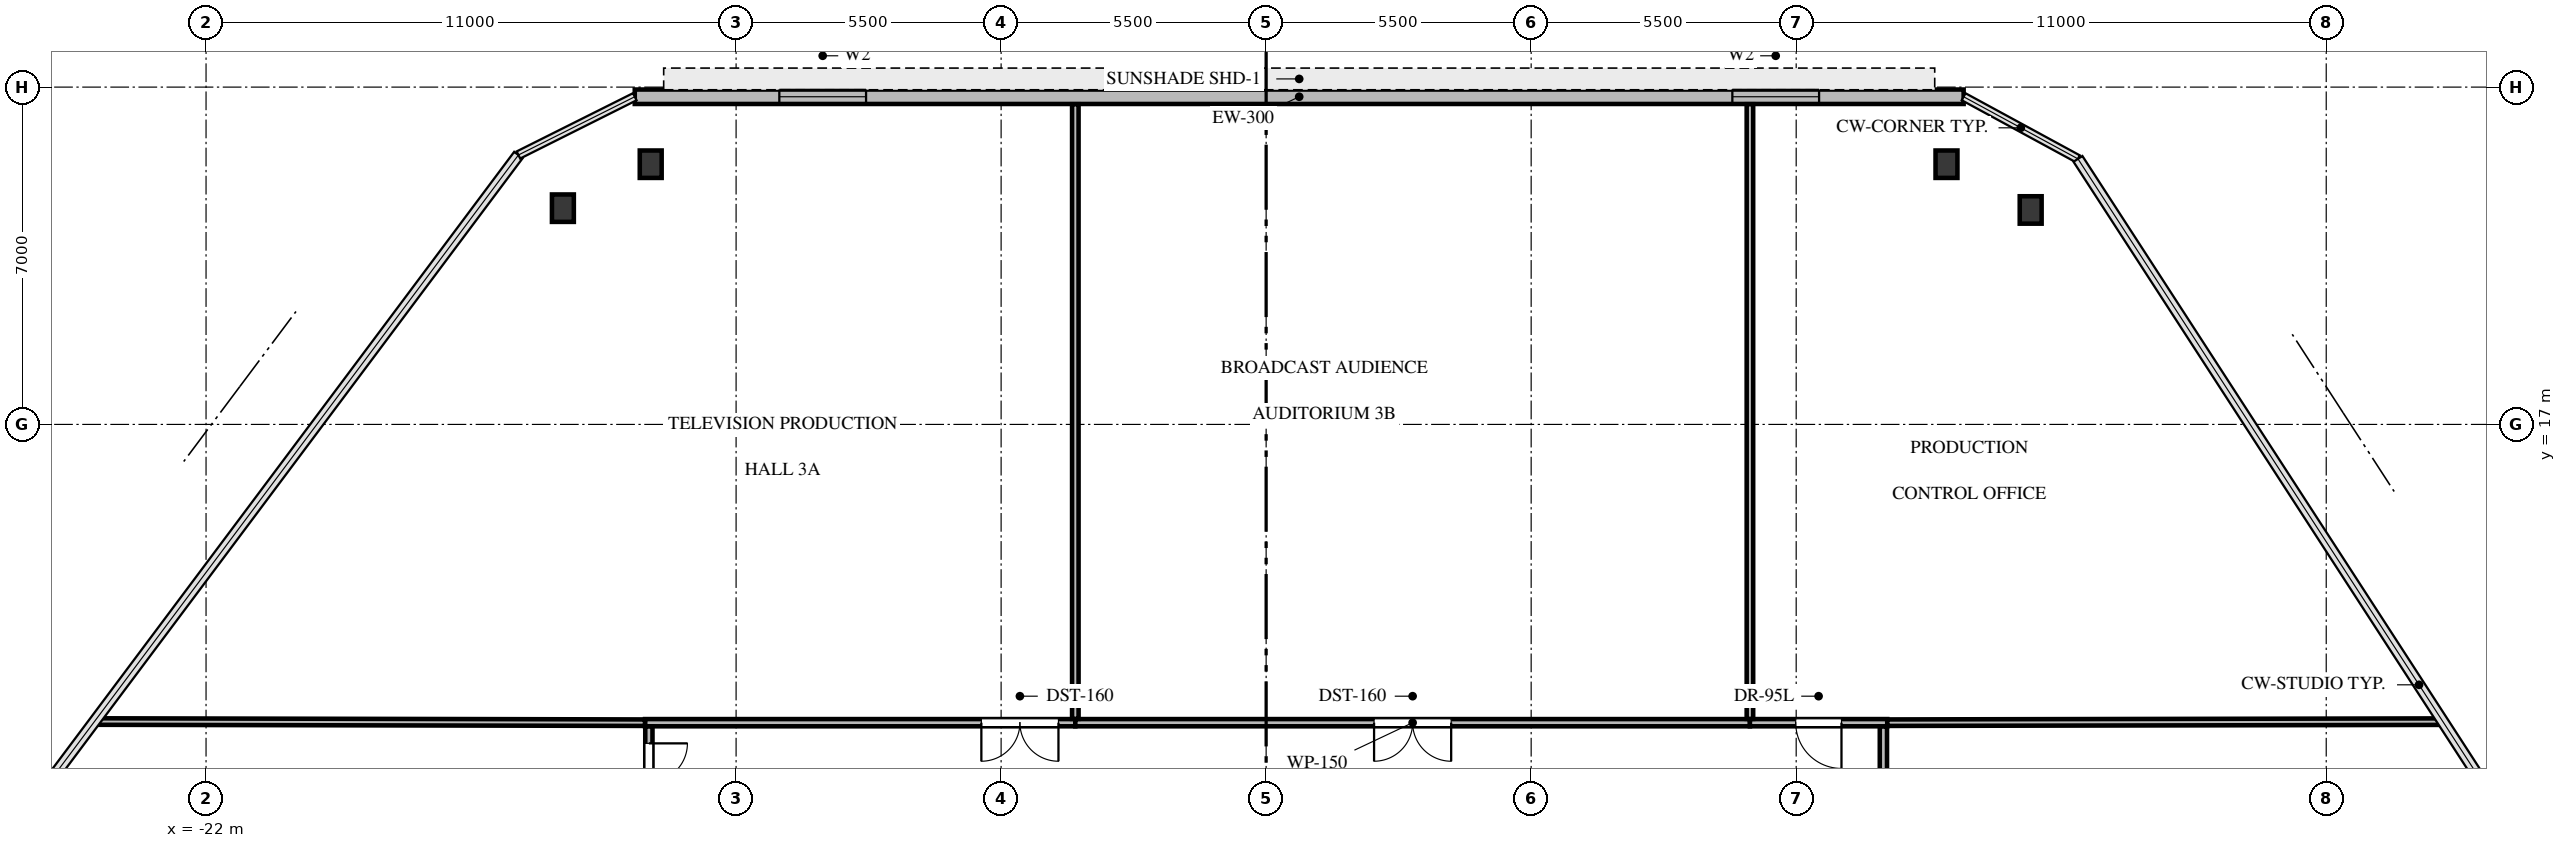
"""IFC4 building model, lengths in metres.
Left out: names, types, materials, properties, quantities, classifications, styles, units other than length and angle.
Written with IfcOpenShell. Run it as: python <this file> out.ifc"""

import sys

from ifc_helpers import new_model, si_unit, direction, frame, frame_2d, origin, origin_2d, place, context, subcontext, project, spatial, rectangle, i_section, extrude, source, transform, mapped, element, fill, save


model = new_model("IFC4")
c1 = context("Model", 3, precision=1e-05, world=origin(), true_north=direction((0.0, 1.0)))
c2 = subcontext(c1, "Body", "Model", "MODEL_VIEW")
j1 = project(units=[si_unit("LENGTHUNIT", "METRE"), si_unit("PLANEANGLEUNIT", "RADIAN")], contexts=[c1])
p1 = place(None, origin())
s1 = spatial("IfcSite", under=j1, at=p1, CompositionType="ELEMENT")
p2 = place(p1, origin())
s2 = spatial("IfcBuilding", under=s1, at=p2, CompositionType="ELEMENT")
p3 = place(p2, frame((0.0, 0.0, 15.6)))
s3 = spatial("IfcBuildingStorey", under=s2, at=p3, CompositionType="ELEMENT", Elevation=15.6)
m1 = source(origin(), c2, "Body", "SweptSolid", [
    extrude(i_section(OverallWidth=0.454, OverallDepth=0.569, WebThickness=0.078, FlangeThickness=0.125, FilletRadius=0.031, at=origin_2d()), origin(), (0.0, 0.0, 1.0), 5.6),
])
for number, where, z_axis, x_axis in (
    (1, (-14.594, 21.488, -0.32), (0.0, 0.0, 1.0), (1.0, 0.0, 0.0)),
    (2, (-12.772, 22.4, -0.32), (0.0, 0.0, 1.0), (1.0, 0.0, 0.0)),
    (3, (14.119, 22.4, -0.32), (0.0, 0.0, 1.0), (1.0, 0.0, 0.0)),
    (4, (15.866, 21.451, -0.32), (0.0, 0.0, 1.0), (1.0, 0.0, 0.0)),
):
    element("IfcColumn", number, at=place(p3, frame(where, z_axis=z_axis, x_axis=x_axis)), inside=s3, PredefinedType="COLUMN", context=c2, shape_type="MappedRepresentation", body=[
        mapped(m1, transform((0.0, 0.0, 0.0), x_axis=(1.0, 0.0, 0.0), y_axis=(0.0, 1.0, 0.0), z_axis=(0.0, 0.0, 1.0), scale=1.0)),
    ])
p4 = place(p3, frame((-13.103, 23.8, 0.0), z_axis=(0.0, 0.0, 1.0), x_axis=(1.0, 0.0, 0.0)))
e5 = element("IfcWall", 5, at=p4, inside=s3, PredefinedType="SOLIDWALL", context=c2, shape_type="SweptSolid", body=[
    extrude(rectangle(XDim=27.578, YDim=0.3, at=frame_2d((13.789, 0.0))), origin(), (0.0, 0.0, 1.0), 5.28),
])
p5 = place(p4, frame((3.0, 0.0, 1.0)))
e6 = element("IfcOpeningElement", 6, at=p5, cuts=e5, PredefinedType="OPENING", context=c2, shape_type="SweptSolid", body=[
    extrude(rectangle(XDim=1.8, YDim=2.1, at=frame_2d((0.9, 1.05))), frame((0.0, 0.16, 0.0), z_axis=(0.0, -1.0, 0.0), x_axis=(1.0, 0.0, 0.0)), (0.0, 0.0, 1.0), 0.32),
])
p6 = place(p4, frame((22.778, 0.0, 1.0)))
e7 = element("IfcOpeningElement", 7, at=p6, cuts=e5, PredefinedType="OPENING", context=c2, shape_type="SweptSolid", body=[
    extrude(rectangle(XDim=1.8, YDim=2.1, at=frame_2d((0.9, 1.05))), frame((0.0, 0.16, 0.0), z_axis=(0.0, -1.0, 0.0), x_axis=(1.0, 0.0, 0.0)), (0.0, 0.0, 1.0), 0.32),
])
p7 = place(p3, frame((-3.96, 10.81, 0.0), z_axis=(0.0, 0.0, 1.0), x_axis=(-1.0, 0.0, 0.0)))
e8 = element("IfcWall", 8, at=p7, inside=s3, PredefinedType="PARTITIONING", context=c2, shape_type="SweptSolid", body=[
    extrude(rectangle(XDim=8.93, YDim=0.15, at=frame_2d((4.465, 0.0))), origin(), (0.0, 0.0, 1.0), 4.284),
])
p8 = place(p7, frame((0.35, 0.0, 0.0)))
e9 = element("IfcOpeningElement", 9, at=p8, cuts=e8, PredefinedType="OPENING", context=c2, shape_type="SweptSolid", body=[
    extrude(rectangle(XDim=1.6, YDim=2.15, at=frame_2d((0.8, 1.075))), frame((0.0, 0.085, 0.0), z_axis=(0.0, -1.0, 0.0), x_axis=(1.0, 0.0, 0.0)), (0.0, 0.0, 1.0), 0.17),
])
p9 = place(p3, frame((10.04, 10.81, 0.0), z_axis=(0.0, 0.0, 1.0), x_axis=(-1.0, 0.0, 0.0)))
e10 = element("IfcWall", 10, at=p9, inside=s3, PredefinedType="PARTITIONING", context=c2, shape_type="SweptSolid", body=[
    extrude(rectangle(XDim=14.0, YDim=0.15, at=frame_2d((7.0, 0.0))), origin(), (0.0, 0.0, 1.0), 4.818),
])
p10 = place(p9, frame((6.2, 0.0, 0.0)))
e11 = element("IfcOpeningElement", 11, at=p10, cuts=e10, PredefinedType="OPENING", context=c2, shape_type="SweptSolid", body=[
    extrude(rectangle(XDim=1.6, YDim=2.15, at=frame_2d((0.8, 1.075))), frame((0.0, 0.085, 0.0), z_axis=(0.0, -1.0, 0.0), x_axis=(1.0, 0.0, 0.0)), (0.0, 0.0, 1.0), 0.17),
])
p11 = place(p3, frame((12.89, 10.81, 0.0), z_axis=(0.0, 0.0, 1.0), x_axis=(-1.0, 0.0, 0.0)))
e12 = element("IfcWall", 12, at=p11, inside=s3, PredefinedType="PARTITIONING", context=c2, shape_type="SweptSolid", body=[
    extrude(rectangle(XDim=2.85, YDim=0.15, at=frame_2d((1.425, 0.0))), origin(), (0.0, 0.0, 1.0), 4.284),
])
p12 = place(p11, frame((0.95, 0.0, 0.0)))
e13 = element("IfcOpeningElement", 13, at=p12, cuts=e12, PredefinedType="OPENING", context=c2, shape_type="SweptSolid", body=[
    extrude(rectangle(XDim=0.95, YDim=2.1, at=frame_2d((0.475, 1.05))), frame((0.0, 0.085, 0.0), z_axis=(0.0, -1.0, 0.0), x_axis=(1.0, 0.0, 0.0)), (0.0, 0.0, 1.0), 0.17),
])
p13 = place(p3, frame((-12.81, 10.731, 0.0), z_axis=(0.0, 0.0, 1.0), x_axis=(0.0, -1.0, 0.0)))
e14 = element("IfcWall", 14, at=p13, inside=s3, PredefinedType="PARTITIONING", context=c2, shape_type="SweptSolid", body=[
    extrude(rectangle(XDim=8.191, YDim=0.15, at=frame_2d((4.095, 0.0))), origin(), (0.0, 0.0, 1.0), 4.284),
])
p14 = place(p13, frame((0.35, 0.0, 0.0)))
e15 = element("IfcOpeningElement", 15, at=p14, cuts=e14, PredefinedType="OPENING", context=c2, shape_type="SweptSolid", body=[
    extrude(rectangle(XDim=1.6, YDim=2.15, at=frame_2d((0.8, 1.075))), frame((0.0, 0.085, 0.0), z_axis=(0.0, -1.0, 0.0), x_axis=(1.0, 0.0, 0.0)), (0.0, 0.0, 1.0), 0.17),
])
p15 = place(p3, frame((12.81, 4.04, 0.0), z_axis=(0.0, 0.0, 1.0), x_axis=(0.0, 1.0, 0.0)))
e16 = element("IfcWall", 16, at=p15, inside=s3, PredefinedType="PARTITIONING", context=c2, shape_type="SweptSolid", body=[
    extrude(rectangle(XDim=6.691, YDim=0.15, at=frame_2d((3.345, 0.0))), origin(), (0.0, 0.0, 1.0), 5.265),
])
p16 = place(p15, frame((2.885, 0.0, 0.0)))
e17 = element("IfcOpeningElement", 17, at=p16, cuts=e16, PredefinedType="OPENING", context=c2, shape_type="SweptSolid", body=[
    extrude(rectangle(XDim=0.92, YDim=2.1, at=frame_2d((0.46, 1.05))), frame((0.0, 0.085, 0.0), z_axis=(0.0, -1.0, 0.0), x_axis=(1.0, 0.0, 0.0)), (0.0, 0.0, 1.0), 0.17),
])
p17 = place(p3, frame((-3.96, 23.645, 0.0), z_axis=(0.0, 0.0, 1.0), x_axis=(0.0, -1.0, 0.0)))
e18 = element("IfcWall", 18, at=p17, inside=s3, PredefinedType="PARTITIONING", context=c2, shape_type="SweptSolid", body=[
    extrude(rectangle(XDim=12.756, YDim=0.135, at=frame_2d((6.378, 0.0))), origin(), (0.0, 0.0, 1.0), 4.574),
])
p18 = place(p3, frame((-12.89, 10.81, 0.0), z_axis=(0.0, 0.0, 1.0), x_axis=(-0.999997852069, 0.002072645121, 0.0)))
e19 = element("IfcWall", 19, at=p18, inside=s3, PredefinedType="PARTITIONING", context=c2, shape_type="SweptSolid", body=[
    extrude(rectangle(XDim=11.426, YDim=0.135, at=frame_2d((5.713, 0.0))), origin(), (0.0, 0.0, 1.0), 4.574),
])
p19 = place(p3, frame((10.04, 23.645, 0.0), z_axis=(0.0, 0.0, 1.0), x_axis=(0.0, -1.0, 0.0)))
e20 = element("IfcWall", 20, at=p19, inside=s3, PredefinedType="PARTITIONING", context=c2, shape_type="SweptSolid", body=[
    extrude(rectangle(XDim=12.756, YDim=0.135, at=frame_2d((6.378, 0.0))), origin(), (0.0, 0.0, 1.0), 4.574),
])
p20 = place(p3, frame((24.422, 10.832, 0.0), z_axis=(0.0, 0.0, 1.0), x_axis=(-0.999998264499, -0.001863061508, 0.0)))
e21 = element("IfcWall", 21, at=p20, inside=s3, PredefinedType="PARTITIONING", context=c2, shape_type="SweptSolid", body=[
    extrude(rectangle(XDim=11.532, YDim=0.135, at=frame_2d((5.766, 0.0))), origin(), (0.0, 0.0, 1.0), 4.574),
])
m2 = source(origin(), c2, "Body", "SweptSolid", [
    extrude(rectangle(XDim=1.8, YDim=2.1, at=frame_2d((0.9, 1.05))), frame((0.0, 0.03, 0.0), z_axis=(0.0, -1.0, 0.0), x_axis=(1.0, 0.0, 0.0)), (0.0, 0.0, 1.0), 0.06),
])
p21 = place(p5, origin())
e22 = element("IfcWindow", 22, at=p21, inside=s3, PartitioningType="DOUBLE_PANEL_VERTICAL", PredefinedType="WINDOW", context=c2, shape_type="MappedRepresentation", body=[
    mapped(m2, transform((0.0, 0.0, 0.0), x_axis=(1.0, 0.0, 0.0), y_axis=(0.0, 1.0, 0.0), z_axis=(0.0, 0.0, 1.0), scale=1.0)),
])
fill(e6, e22)
p22 = place(p6, origin())
e23 = element("IfcWindow", 23, at=p22, inside=s3, PartitioningType="DOUBLE_PANEL_VERTICAL", PredefinedType="WINDOW", context=c2, shape_type="MappedRepresentation", body=[
    mapped(m2, transform((0.0, 0.0, 0.0), x_axis=(1.0, 0.0, 0.0), y_axis=(0.0, 1.0, 0.0), z_axis=(0.0, 0.0, 1.0), scale=1.0)),
])
fill(e7, e23)
m3 = source(origin(), c2, "Body", "SweptSolid", [
    extrude(rectangle(XDim=1.6, YDim=2.15, at=frame_2d((0.8, 1.075))), frame((0.0, 0.025, 0.0), z_axis=(0.0, -1.0, 0.0), x_axis=(1.0, 0.0, 0.0)), (0.0, 0.0, 1.0), 0.05),
])
p23 = place(p8, origin())
e24 = element("IfcDoor", 24, at=p23, inside=s3, OperationType="DOUBLE_DOOR_SINGLE_SWING", PredefinedType="DOOR", context=c2, shape_type="MappedRepresentation", body=[
    mapped(m3, transform((0.0, 0.0, 0.0), x_axis=(1.0, 0.0, 0.0), y_axis=(0.0, 1.0, 0.0), z_axis=(0.0, 0.0, 1.0), scale=1.0)),
])
fill(e9, e24)
p24 = place(p10, origin())
e25 = element("IfcDoor", 25, at=p24, inside=s3, OperationType="DOUBLE_DOOR_SINGLE_SWING", PredefinedType="DOOR", context=c2, shape_type="MappedRepresentation", body=[
    mapped(m3, transform((0.0, 0.0, 0.0), x_axis=(1.0, 0.0, 0.0), y_axis=(0.0, 1.0, 0.0), z_axis=(0.0, 0.0, 1.0), scale=1.0)),
])
fill(e11, e25)
m4 = source(origin(), c2, "Body", "SweptSolid", [
    extrude(rectangle(XDim=0.95, YDim=2.1, at=frame_2d((0.475, 1.05))), frame((0.0, 0.025, 0.0), z_axis=(0.0, -1.0, 0.0), x_axis=(1.0, 0.0, 0.0)), (0.0, 0.0, 1.0), 0.05),
])
p25 = place(p12, origin())
e26 = element("IfcDoor", 26, at=p25, inside=s3, OperationType="SINGLE_SWING_LEFT", PredefinedType="DOOR", context=c2, shape_type="MappedRepresentation", body=[
    mapped(m4, transform((0.0, 0.0, 0.0), x_axis=(1.0, 0.0, 0.0), y_axis=(0.0, 1.0, 0.0), z_axis=(0.0, 0.0, 1.0), scale=1.0)),
])
fill(e13, e26)
p26 = place(p14, origin())
e27 = element("IfcDoor", 27, at=p26, inside=s3, OperationType="DOUBLE_DOOR_SINGLE_SWING", PredefinedType="DOOR", context=c2, shape_type="MappedRepresentation", body=[
    mapped(m3, transform((0.0, 0.0, 0.0), x_axis=(1.0, 0.0, 0.0), y_axis=(0.0, 1.0, 0.0), z_axis=(0.0, 0.0, 1.0), scale=1.0)),
])
fill(e15, e27)
save(model, sys.argv[1])
